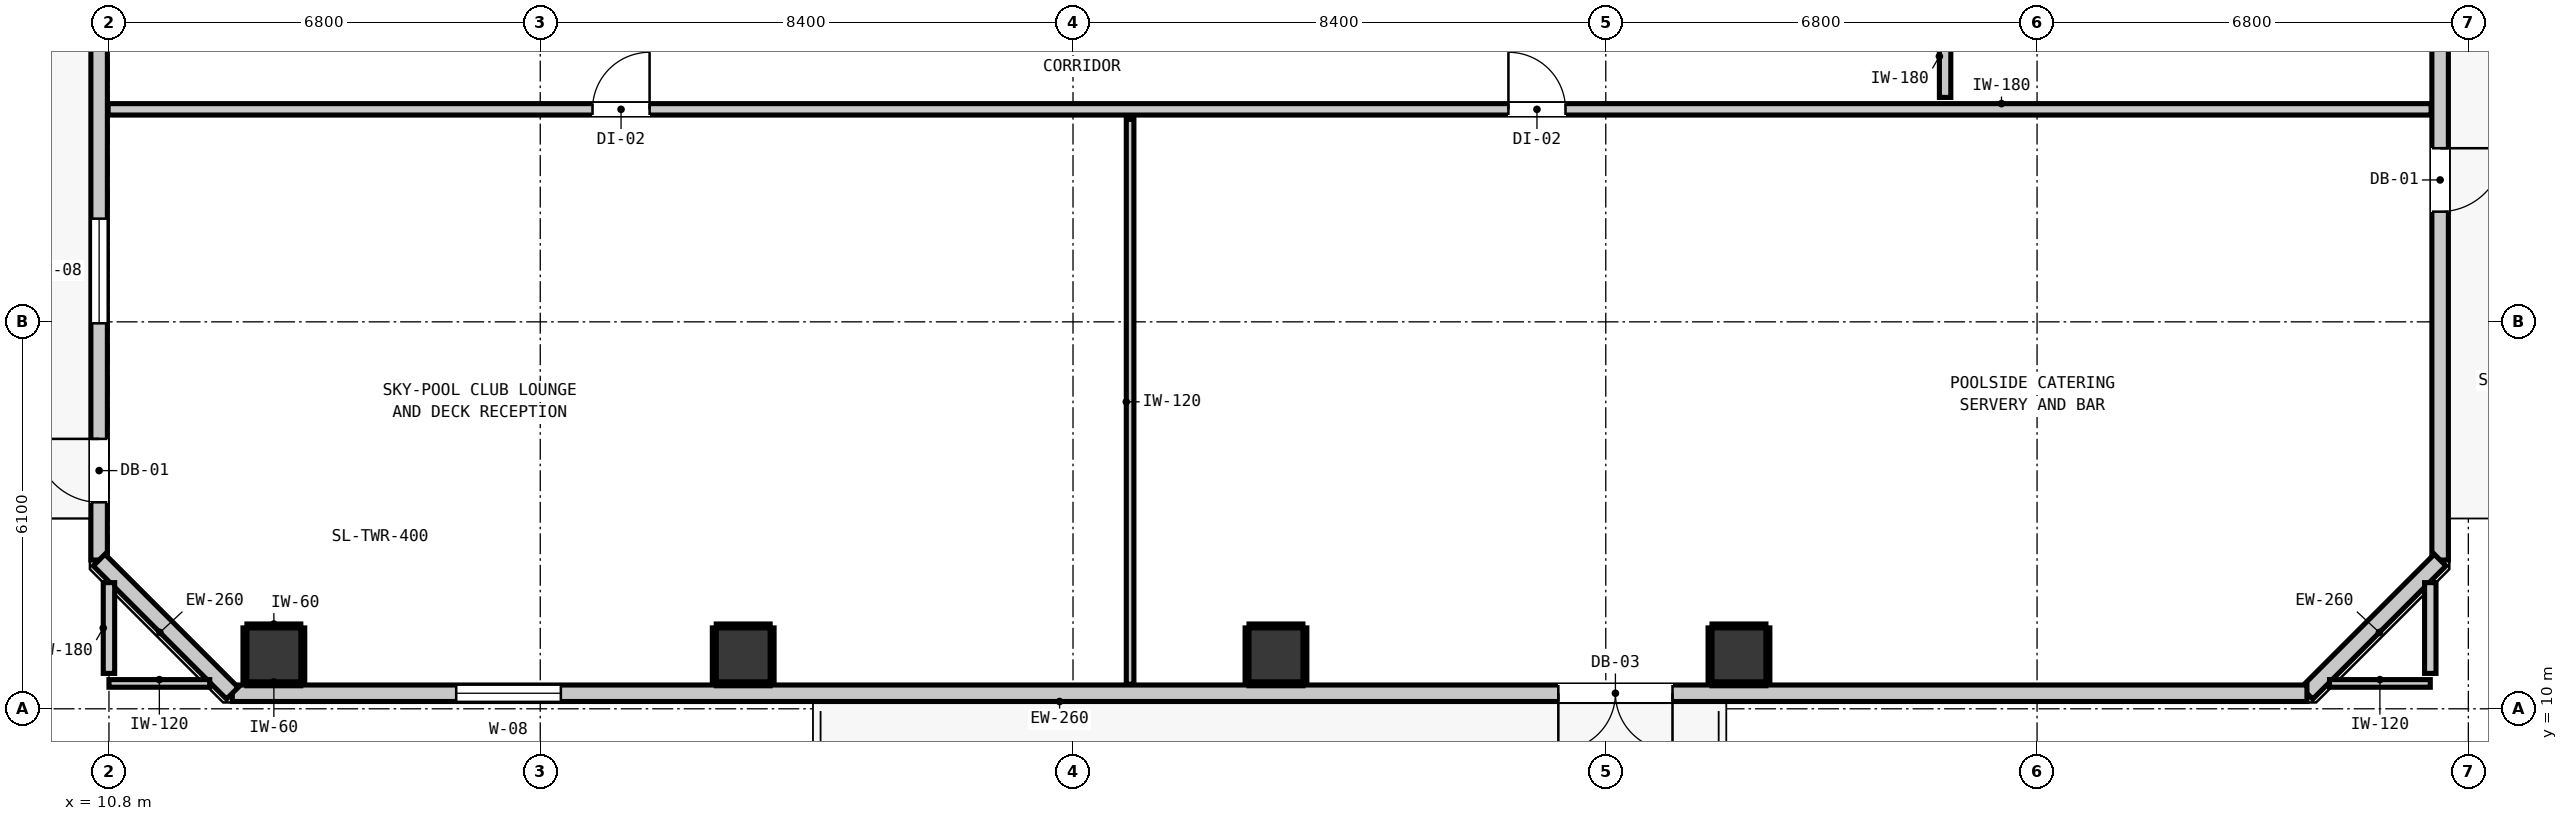
"""IFC4 building model, lengths in metres.
Left out: names, types, materials, properties, quantities, classifications, styles, units other than length and angle.
Written with IfcOpenShell. Run it as: python <this file> out.ifc"""

import sys

from ifc_helpers import new_model, si_unit, direction, frame, frame_2d, origin, origin_2d, place, context, subcontext, project, spatial, rectangle, extrude, element, fill, save


model = new_model("IFC4")
c1 = context("Model", 3, precision=1e-05, world=origin(), true_north=direction((0.0, 1.0)))
c2 = subcontext(c1, "Body", "Model", "MODEL_VIEW")
j1 = project(units=[si_unit("LENGTHUNIT", "METRE"), si_unit("PLANEANGLEUNIT", "RADIAN")], contexts=[c1])
p1 = place(None, origin())
s1 = spatial("IfcSite", under=j1, at=p1, CompositionType="ELEMENT")
p2 = place(p1, origin())
s2 = spatial("IfcBuilding", under=s1, at=p2, CompositionType="ELEMENT")
p3 = place(p2, frame((0.0, 0.0, 226.68)))
s3 = spatial("IfcBuildingStorey", under=s2, at=p3, CompositionType="ELEMENT", Elevation=226.68)
for number, where, z_axis, x_axis in (
    (1, (13.4, 10.85, 0.0), (0.0, 0.0, 1.0), (1.0, 0.0, 0.0)),
    (2, (20.8, 10.85, 0.0), (0.0, 0.0, 1.0), (1.0, 0.0, 0.0)),
    (3, (29.2, 10.85, 0.0), (0.0, 0.0, 1.0), (1.0, 0.0, 0.0)),
    (4, (36.5, 10.85, 0.0), (0.0, 0.0, 1.0), (1.0, 0.0, 0.0)),
):
    element("IfcColumn", number, at=place(p3, frame(where, z_axis=z_axis, x_axis=x_axis)), inside=s3, PredefinedType="COLUMN", context=c2, shape_type="SweptSolid", body=[
        extrude(rectangle(XDim=0.85, YDim=0.85, at=origin_2d()), origin(), (0.0, 0.0, 1.0), 4.18),
    ])
p4 = place(p3, frame((10.645, 12.345, 0.0), z_axis=(0.0, 0.0, 1.0), x_axis=(0.0, 1.0, 0.0)))
e5 = element("IfcWall", 5, at=p4, inside=s3, PredefinedType="STANDARD", context=c2, shape_type="SweptSolid", body=[
    extrude(rectangle(XDim=30.31, YDim=0.26, at=frame_2d((15.155, 0.0))), origin(), (0.0, 0.0, 1.0), 4.18),
])
p5 = place(p4, frame((0.91, 0.0, 0.0)))
e6 = element("IfcOpeningElement", 6, at=p5, cuts=e5, PredefinedType="OPENING", context=c2, shape_type="SweptSolid", body=[
    extrude(rectangle(XDim=1.0, YDim=2.15, at=frame_2d((0.5, 1.075))), frame((0.0, 0.14, 0.0), z_axis=(0.0, -1.0, 0.0), x_axis=(1.0, 0.0, 0.0)), (0.0, 0.0, 1.0), 0.28),
])
p6 = place(p4, frame((3.732, 0.0, 0.85)))
e7 = element("IfcOpeningElement", 7, at=p6, cuts=e5, PredefinedType="OPENING", context=c2, shape_type="SweptSolid", body=[
    extrude(rectangle(XDim=1.65, YDim=1.75, at=frame_2d((0.825, 0.875))), frame((0.0, 0.14, 0.0), z_axis=(0.0, -1.0, 0.0), x_axis=(1.0, 0.0, 0.0)), (0.0, 0.0, 1.0), 0.28),
])
p7 = place(p3, frame((47.555, 42.655, 0.0), z_axis=(0.0, 0.0, 1.0), x_axis=(0.0, -1.0, 0.0)))
e8 = element("IfcWall", 8, at=p7, inside=s3, PredefinedType="STANDARD", context=c2, shape_type="SweptSolid", body=[
    extrude(rectangle(XDim=30.31, YDim=0.26, at=frame_2d((15.155, 0.0))), origin(), (0.0, 0.0, 1.0), 4.18),
])
p8 = place(p7, frame((23.818, 0.0, 0.0)))
e9 = element("IfcOpeningElement", 9, at=p8, cuts=e8, PredefinedType="OPENING", context=c2, shape_type="SweptSolid", body=[
    extrude(rectangle(XDim=1.0, YDim=2.15, at=frame_2d((0.5, 1.075))), frame((0.0, 0.14, 0.0), z_axis=(0.0, -1.0, 0.0), x_axis=(1.0, 0.0, 0.0)), (0.0, 0.0, 1.0), 0.28),
])
p9 = place(p3, frame((47.555, 12.345, 0.0), z_axis=(0.0, 0.0, 1.0), x_axis=(-0.707106781187, -0.707106781187, 0.0)))
e10 = element("IfcWall", 10, at=p9, inside=s3, PredefinedType="STANDARD", context=c2, shape_type="SweptSolid", body=[
    extrude(rectangle(XDim=2.97, YDim=0.26, at=frame_2d((1.485, 0.0))), origin(), (0.0, 0.0, 1.0), 4.18),
])
p10 = place(p3, frame((45.455, 10.245, 0.0), z_axis=(0.0, 0.0, 1.0), x_axis=(-1.0, 0.0, 0.0)))
e11 = element("IfcWall", 11, at=p10, inside=s3, PredefinedType="STANDARD", context=c2, shape_type="SweptSolid", body=[
    extrude(rectangle(XDim=32.71, YDim=0.26, at=frame_2d((16.355, 0.0))), origin(), (0.0, 0.0, 1.0), 4.18),
])
p11 = place(p10, frame((10.003, 0.0, 0.0)))
e12 = element("IfcOpeningElement", 12, at=p11, cuts=e11, PredefinedType="OPENING", context=c2, shape_type="SweptSolid", body=[
    extrude(rectangle(XDim=1.8, YDim=2.2, at=frame_2d((0.9, 1.1))), frame((0.0, 0.14, 0.0), z_axis=(0.0, -1.0, 0.0), x_axis=(1.0, 0.0, 0.0)), (0.0, 0.0, 1.0), 0.28),
])
p12 = place(p10, frame((27.53, 0.0, 0.85)))
e13 = element("IfcOpeningElement", 13, at=p12, cuts=e11, PredefinedType="OPENING", context=c2, shape_type="SweptSolid", body=[
    extrude(rectangle(XDim=1.65, YDim=1.75, at=frame_2d((0.825, 0.875))), frame((0.0, 0.14, 0.0), z_axis=(0.0, -1.0, 0.0), x_axis=(1.0, 0.0, 0.0)), (0.0, 0.0, 1.0), 0.28),
])
p13 = place(p3, frame((12.745, 10.245, 0.0), z_axis=(0.0, 0.0, 1.0), x_axis=(-0.707147883682, 0.707065676302, 0.0)))
e14 = element("IfcWall", 14, at=p13, inside=s3, PredefinedType="STANDARD", context=c2, shape_type="SweptSolid", body=[
    extrude(rectangle(XDim=2.97, YDim=0.26, at=frame_2d((1.485, 0.0))), origin(), (0.0, 0.0, 1.0), 4.18),
])
p14 = place(p3, frame((10.787, 19.45, 0.0), z_axis=(0.0, 0.0, 1.0), x_axis=(1.0, 0.0, 0.0)))
e15 = element("IfcWall", 15, at=p14, inside=s3, PredefinedType="PARTITIONING", context=c2, shape_type="SweptSolid", body=[
    extrude(rectangle(XDim=36.626, YDim=0.18, at=frame_2d((18.313, 0.0))), origin(), (0.0, 0.0, 1.0), 4.18),
])
p15 = place(p14, frame((7.637, 0.0, 0.0)))
e16 = element("IfcOpeningElement", 16, at=p15, cuts=e15, PredefinedType="OPENING", context=c2, shape_type="SweptSolid", body=[
    extrude(rectangle(XDim=0.9, YDim=2.1, at=frame_2d((0.45, 1.05))), frame((0.0, 0.1, 0.0), z_axis=(0.0, -1.0, 0.0), x_axis=(1.0, 0.0, 0.0)), (0.0, 0.0, 1.0), 0.2),
])
p16 = place(p14, frame((22.078, 0.0, 0.0)))
e17 = element("IfcOpeningElement", 17, at=p16, cuts=e15, PredefinedType="OPENING", context=c2, shape_type="SweptSolid", body=[
    extrude(rectangle(XDim=0.9, YDim=2.1, at=frame_2d((0.45, 1.05))), frame((0.0, 0.1, 0.0), z_axis=(0.0, -1.0, 0.0), x_axis=(1.0, 0.0, 0.0)), (0.0, 0.0, 1.0), 0.2),
])
for number, where, z_axis, x_axis in (
    (18, (10.8, 10.4, 0.0), (0.0, 0.0, 1.0), (1.0, 0.0, 0.0)),
    (19, (45.811, 10.4, 0.0), (0.0, 0.0, 1.0), (1.0, 0.0, 0.0)),
):
    element("IfcWall", number, at=place(p3, frame(where, z_axis=z_axis, x_axis=x_axis)), inside=s3, PredefinedType="PARTITIONING", context=c2, shape_type="SweptSolid", body=[
        extrude(rectangle(XDim=1.589, YDim=0.12, at=frame_2d((0.794, 0.0))), origin(), (0.0, 0.0, 1.0), 4.18),
    ])
p17 = place(p3, frame((10.8, 10.558, 0.0), z_axis=(0.0, 0.0, 1.0), x_axis=(0.0, 1.0, 0.0)))
e20 = element("IfcWall", 20, at=p17, inside=s3, PredefinedType="PARTITIONING", context=c2, shape_type="SweptSolid", body=[
    extrude(rectangle(XDim=1.431, YDim=0.18, at=frame_2d((0.715, 0.0))), origin(), (0.0, 0.0, 1.0), 4.18),
])
p18 = place(p3, frame((39.75, 19.638, 0.0), z_axis=(0.0, 0.0, 1.0), x_axis=(0.0, 1.0, 0.0)))
e21 = element("IfcWall", 21, at=p18, inside=s3, PredefinedType="PARTITIONING", context=c2, shape_type="SweptSolid", body=[
    extrude(rectangle(XDim=1.294, YDim=0.18, at=frame_2d((0.647, 0.0))), origin(), (0.0, 0.0, 1.0), 4.18),
])
p19 = place(p3, frame((47.4, 10.558, 0.0), z_axis=(0.0, 0.0, 1.0), x_axis=(0.0, 1.0, 0.0)))
e22 = element("IfcWall", 22, at=p19, inside=s3, PredefinedType="PARTITIONING", context=c2, shape_type="SweptSolid", body=[
    extrude(rectangle(XDim=1.431, YDim=0.18, at=frame_2d((0.715, 0.0))), origin(), (0.0, 0.0, 1.0), 4.18),
])
p20 = place(p3, frame((26.9, 10.387, 0.0), z_axis=(0.0, 0.0, 1.0), x_axis=(0.0, 1.0, 0.0)))
e23 = element("IfcWall", 23, at=p20, inside=s3, PredefinedType="PARTITIONING", context=c2, shape_type="SweptSolid", body=[
    extrude(rectangle(XDim=8.905, YDim=0.12, at=frame_2d((4.453, 0.0))), origin(), (0.0, 0.0, 1.0), 4.18),
])
for number, where, z_axis, x_axis in (
    (24, (12.975, 10.393, 0.0), (0.0, 0.0, 1.0), (1.0, 0.0, 0.0)),
    (25, (12.975, 11.307, 0.0), (0.0, 0.0, 1.0), (1.0, 0.0, 0.0)),
    (26, (12.943, 10.425, 0.0), (0.0, 0.0, 1.0), (0.0, 1.0, 0.0)),
    (27, (13.857, 10.425, 0.0), (0.0, 0.0, 1.0), (0.0, 1.0, 0.0)),
):
    element("IfcWall", number, at=place(p3, frame(where, z_axis=z_axis, x_axis=x_axis)), inside=s3, PredefinedType="PARTITIONING", context=c2, shape_type="SweptSolid", body=[
        extrude(rectangle(XDim=0.85, YDim=0.06, at=frame_2d((0.425, 0.0))), origin(), (0.0, 0.0, 1.0), 1.45),
    ])
for number, where, z_axis, x_axis in (
    (28, (20.375, 10.393, 0.0), (0.0, 0.0, 1.0), (1.0, 0.0, 0.0)),
    (29, (20.375, 11.307, 0.0), (0.0, 0.0, 1.0), (1.0, 0.0, 0.0)),
):
    element("IfcWall", number, at=place(p3, frame(where, z_axis=z_axis, x_axis=x_axis)), inside=s3, PredefinedType="PARTITIONING", context=c2, shape_type="SweptSolid", body=[
        extrude(rectangle(XDim=0.85, YDim=0.06, at=frame_2d((0.425, 0.0))), origin(), (0.0, 0.0, 1.0), 1.45),
    ])
for number, where, z_axis, x_axis in (
    (30, (20.343, 10.425, 0.0), (0.0, 0.0, 1.0), (0.0, 1.0, 0.0)),
    (31, (21.257, 10.425, 0.0), (0.0, 0.0, 1.0), (0.0, 1.0, 0.0)),
):
    element("IfcWall", number, at=place(p3, frame(where, z_axis=z_axis, x_axis=x_axis)), inside=s3, PredefinedType="PARTITIONING", context=c2, shape_type="SweptSolid", body=[
        extrude(rectangle(XDim=0.85, YDim=0.06, at=frame_2d((0.425, 0.0))), origin(), (0.0, 0.0, 1.0), 1.45),
    ])
for number, where, z_axis, x_axis in (
    (32, (28.775, 10.393, 0.0), (0.0, 0.0, 1.0), (1.0, 0.0, 0.0)),
    (33, (28.775, 11.307, 0.0), (0.0, 0.0, 1.0), (1.0, 0.0, 0.0)),
):
    element("IfcWall", number, at=place(p3, frame(where, z_axis=z_axis, x_axis=x_axis)), inside=s3, PredefinedType="PARTITIONING", context=c2, shape_type="SweptSolid", body=[
        extrude(rectangle(XDim=0.85, YDim=0.06, at=frame_2d((0.425, 0.0))), origin(), (0.0, 0.0, 1.0), 1.45),
    ])
for number, where, z_axis, x_axis in (
    (34, (28.743, 10.425, 0.0), (0.0, 0.0, 1.0), (0.0, 1.0, 0.0)),
    (35, (29.657, 10.425, 0.0), (0.0, 0.0, 1.0), (0.0, 1.0, 0.0)),
):
    element("IfcWall", number, at=place(p3, frame(where, z_axis=z_axis, x_axis=x_axis)), inside=s3, PredefinedType="PARTITIONING", context=c2, shape_type="SweptSolid", body=[
        extrude(rectangle(XDim=0.85, YDim=0.06, at=frame_2d((0.425, 0.0))), origin(), (0.0, 0.0, 1.0), 1.45),
    ])
for number, where, z_axis, x_axis in (
    (36, (36.075, 10.393, 0.0), (0.0, 0.0, 1.0), (1.0, 0.0, 0.0)),
    (37, (36.075, 11.307, 0.0), (0.0, 0.0, 1.0), (1.0, 0.0, 0.0)),
):
    element("IfcWall", number, at=place(p3, frame(where, z_axis=z_axis, x_axis=x_axis)), inside=s3, PredefinedType="PARTITIONING", context=c2, shape_type="SweptSolid", body=[
        extrude(rectangle(XDim=0.85, YDim=0.06, at=frame_2d((0.425, 0.0))), origin(), (0.0, 0.0, 1.0), 1.45),
    ])
for number, where, z_axis, x_axis in (
    (38, (36.043, 10.425, 0.0), (0.0, 0.0, 1.0), (0.0, 1.0, 0.0)),
    (39, (36.957, 10.425, 0.0), (0.0, 0.0, 1.0), (0.0, 1.0, 0.0)),
):
    element("IfcWall", number, at=place(p3, frame(where, z_axis=z_axis, x_axis=x_axis)), inside=s3, PredefinedType="PARTITIONING", context=c2, shape_type="SweptSolid", body=[
        extrude(rectangle(XDim=0.85, YDim=0.06, at=frame_2d((0.425, 0.0))), origin(), (0.0, 0.0, 1.0), 1.45),
    ])
p21 = place(p8, origin())
e40 = element("IfcDoor", 40, at=p21, inside=s3, OperationType="SINGLE_SWING_LEFT", PredefinedType="DOOR", context=c2, shape_type="SweptSolid", body=[
    extrude(rectangle(XDim=1.0, YDim=2.15, at=frame_2d((0.5, 1.075))), frame((0.0, 0.025, 0.0), z_axis=(0.0, -1.0, 0.0), x_axis=(1.0, 0.0, 0.0)), (0.0, 0.0, 1.0), 0.05),
])
fill(e9, e40)
p22 = place(p5, origin())
e41 = element("IfcDoor", 41, at=p22, inside=s3, OperationType="SINGLE_SWING_RIGHT", PredefinedType="DOOR", context=c2, shape_type="SweptSolid", body=[
    extrude(rectangle(XDim=1.0, YDim=2.15, at=frame_2d((0.5, 1.075))), frame((0.0, 0.025, 0.0), z_axis=(0.0, -1.0, 0.0), x_axis=(1.0, 0.0, 0.0)), (0.0, 0.0, 1.0), 0.05),
])
fill(e6, e41)
p23 = place(p11, origin())
e42 = element("IfcDoor", 42, at=p23, inside=s3, OperationType="DOUBLE_DOOR_SINGLE_SWING", PredefinedType="DOOR", context=c2, shape_type="SweptSolid", body=[
    extrude(rectangle(XDim=1.8, YDim=2.2, at=frame_2d((0.9, 1.1))), frame((0.0, 0.025, 0.0), z_axis=(0.0, -1.0, 0.0), x_axis=(1.0, 0.0, 0.0)), (0.0, 0.0, 1.0), 0.05),
])
fill(e12, e42)
p24 = place(p6, origin())
e43 = element("IfcWindow", 43, at=p24, inside=s3, PartitioningType="SINGLE_PANEL", PredefinedType="WINDOW", context=c2, shape_type="SweptSolid", body=[
    extrude(rectangle(XDim=1.65, YDim=1.75, at=frame_2d((0.825, 0.875))), frame((0.0, 0.03, 0.0), z_axis=(0.0, -1.0, 0.0), x_axis=(1.0, 0.0, 0.0)), (0.0, 0.0, 1.0), 0.06),
])
fill(e7, e43)
p25 = place(p12, origin())
e44 = element("IfcWindow", 44, at=p25, inside=s3, PartitioningType="SINGLE_PANEL", PredefinedType="WINDOW", context=c2, shape_type="SweptSolid", body=[
    extrude(rectangle(XDim=1.65, YDim=1.75, at=frame_2d((0.825, 0.875))), frame((0.0, 0.03, 0.0), z_axis=(0.0, -1.0, 0.0), x_axis=(1.0, 0.0, 0.0)), (0.0, 0.0, 1.0), 0.06),
])
fill(e13, e44)
p26 = place(p15, origin())
e45 = element("IfcDoor", 45, at=p26, inside=s3, OperationType="SINGLE_SWING_RIGHT", PredefinedType="DOOR", context=c2, shape_type="SweptSolid", body=[
    extrude(rectangle(XDim=0.9, YDim=2.1, at=frame_2d((0.45, 1.05))), frame((0.0, 0.025, 0.0), z_axis=(0.0, -1.0, 0.0), x_axis=(1.0, 0.0, 0.0)), (0.0, 0.0, 1.0), 0.05),
])
fill(e16, e45)
p27 = place(p16, origin())
e46 = element("IfcDoor", 46, at=p27, inside=s3, OperationType="SINGLE_SWING_LEFT", PredefinedType="DOOR", context=c2, shape_type="SweptSolid", body=[
    extrude(rectangle(XDim=0.9, YDim=2.1, at=frame_2d((0.45, 1.05))), frame((0.0, 0.025, 0.0), z_axis=(0.0, -1.0, 0.0), x_axis=(1.0, 0.0, 0.0)), (0.0, 0.0, 1.0), 0.05),
])
fill(e17, e46)
save(model, sys.argv[1])
